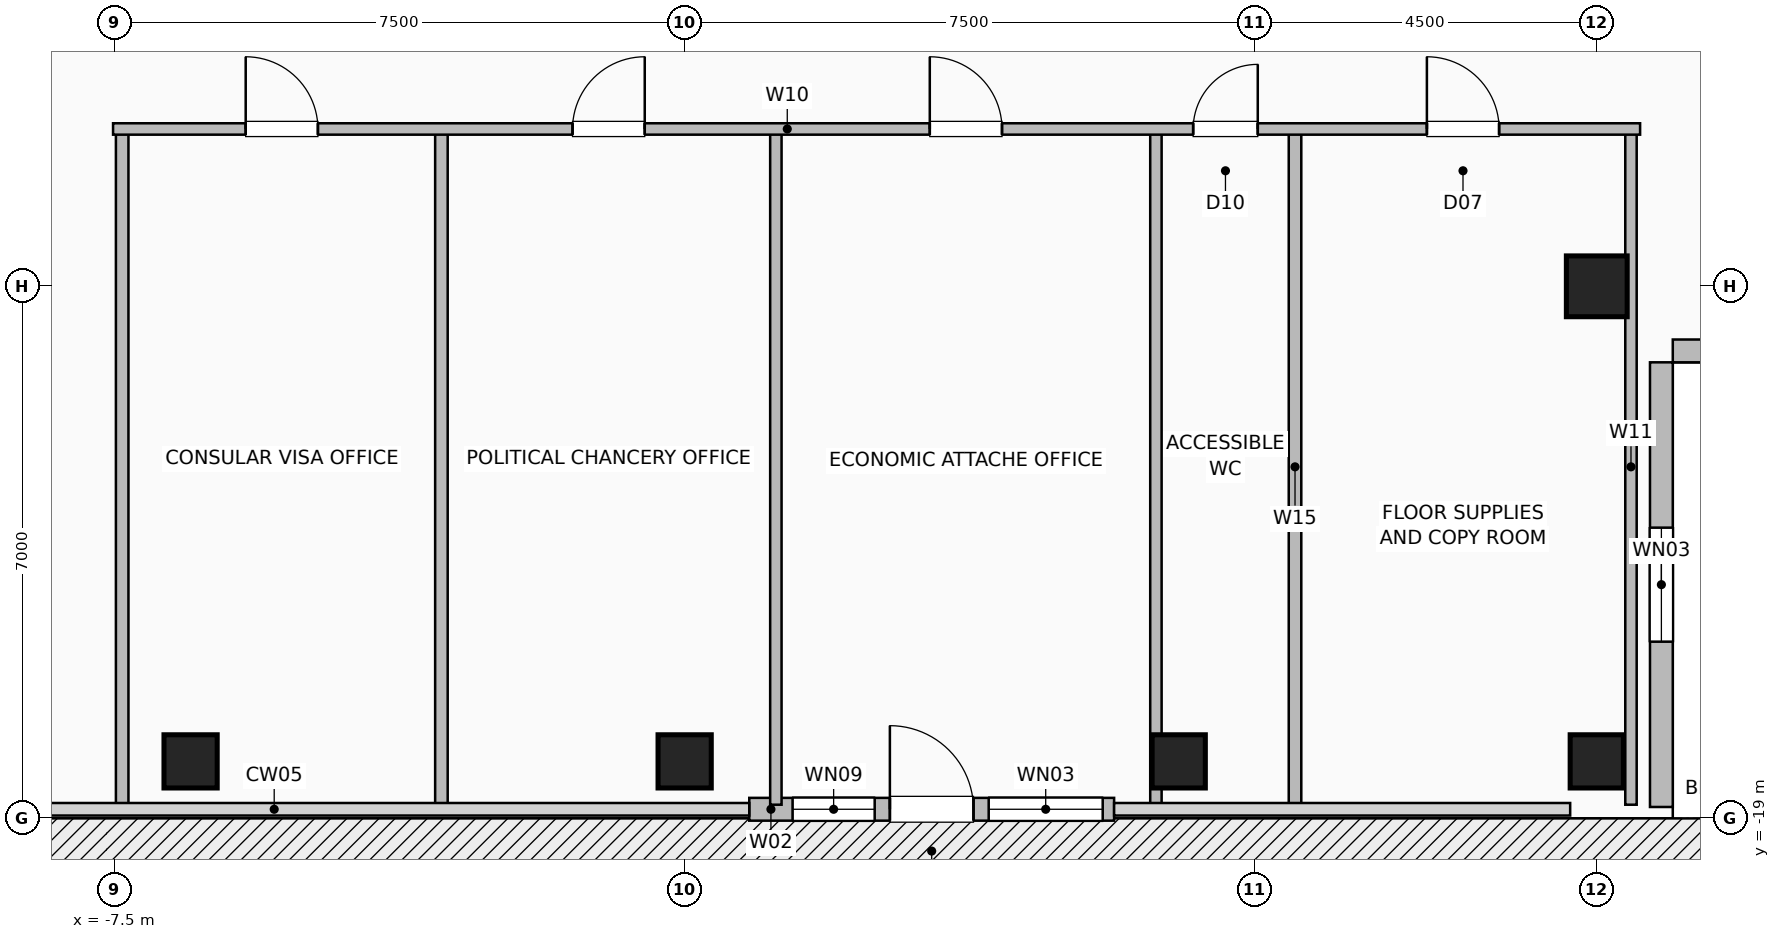
"""IFC4 building model, lengths in metres.
Left out: names, types, materials, properties, quantities, classifications, styles, units other than length and angle.
Written with IfcOpenShell. Run it as: python <this file> out.ifc"""

import sys

from ifc_helpers import new_model, si_unit, direction, frame, frame_2d, origin, origin_2d, place, context, subcontext, project, spatial, rectangle, hollow_rectangle, extrude, element, fill, save


model = new_model("IFC4")
c1 = context("Model", 3, precision=1e-05, world=origin(), true_north=direction((0.0, 1.0)))
c2 = subcontext(c1, "Body", "Model", "MODEL_VIEW")
j1 = project(units=[si_unit("LENGTHUNIT", "METRE"), si_unit("PLANEANGLEUNIT", "RADIAN")], contexts=[c1])
p1 = place(None, origin())
s1 = spatial("IfcSite", under=j1, at=p1, CompositionType="ELEMENT")
p2 = place(p1, origin())
s2 = spatial("IfcBuilding", under=s1, at=p2, CompositionType="ELEMENT")
p3 = place(p2, frame((0.0, 0.0, 232.4)))
s3 = spatial("IfcBuildingStorey", under=s2, at=p3, CompositionType="ELEMENT", Elevation=232.4)
for number, where, z_axis, x_axis in (
    (1, (-6.5, -18.25, -0.4), (0.0, 0.0, 1.0), (1.0, 0.0, 0.0)),
    (2, (0.0, -18.25, -0.4), (0.0, 0.0, 1.0), (1.0, 0.0, 0.0)),
    (3, (6.5, -18.25, -0.4), (0.0, 0.0, 1.0), (1.0, 0.0, 0.0)),
    (4, (12.0, -18.25, -0.4), (0.0, 0.0, 1.0), (1.0, 0.0, 0.0)),
):
    element("IfcColumn", number, at=place(p3, frame(where, z_axis=z_axis, x_axis=x_axis)), inside=s3, PredefinedType="COLUMN", context=c2, shape_type="SweptSolid", body=[
        extrude(hollow_rectangle(XDim=0.7, YDim=0.7, WallThickness=0.035, at=origin_2d()), origin(), (0.0, 0.0, 1.0), 4.0),
    ])
p4 = place(p3, frame((12.0, -12.0, -0.4), z_axis=(0.0, 0.0, 1.0), x_axis=(1.0, 0.0, 0.0)))
e5 = element("IfcColumn", 5, at=p4, inside=s3, PredefinedType="COLUMN", context=c2, shape_type="SweptSolid", body=[
    extrude(hollow_rectangle(XDim=0.8, YDim=0.8, WallThickness=0.04, at=origin_2d()), origin(), (0.0, 0.0, 1.0), 4.0),
])
p5 = place(p3, frame((0.85, -18.88, 0.0), z_axis=(0.0, 0.0, 1.0), x_axis=(1.0, 0.0, 0.0)))
e6 = element("IfcWall", 6, at=p5, inside=s3, PredefinedType="SOLIDWALL", context=c2, shape_type="SweptSolid", body=[
    extrude(rectangle(XDim=4.8, YDim=0.3, at=frame_2d((2.4, 0.0))), origin(), (0.0, 0.0, 1.0), 3.36),
])
p6 = place(p5, frame((1.85, 0.0, 0.0)))
e7 = element("IfcOpeningElement", 7, at=p6, cuts=e6, PredefinedType="OPENING", context=c2, shape_type="SweptSolid", body=[
    extrude(rectangle(XDim=1.1, YDim=2.2, at=frame_2d((0.55, 1.1))), frame((0.0, 0.16, 0.0), z_axis=(0.0, -1.0, 0.0), x_axis=(1.0, 0.0, 0.0)), (0.0, 0.0, 1.0), 0.32),
])
p7 = place(p5, frame((0.57, 0.0, 0.85)))
e8 = element("IfcOpeningElement", 8, at=p7, cuts=e6, PredefinedType="OPENING", context=c2, shape_type="SweptSolid", body=[
    extrude(rectangle(XDim=1.08, YDim=1.8, at=frame_2d((0.54, 0.9))), frame((0.0, 0.16, 0.0), z_axis=(0.0, -1.0, 0.0), x_axis=(1.0, 0.0, 0.0)), (0.0, 0.0, 1.0), 0.32),
])
p8 = place(p5, frame((3.15, 0.0, 0.85)))
e9 = element("IfcOpeningElement", 9, at=p8, cuts=e6, PredefinedType="OPENING", context=c2, shape_type="SweptSolid", body=[
    extrude(rectangle(XDim=1.5, YDim=1.8, at=frame_2d((0.75, 0.9))), frame((0.0, 0.16, 0.0), z_axis=(0.0, -1.0, 0.0), x_axis=(1.0, 0.0, 0.0)), (0.0, 0.0, 1.0), 0.32),
])
p9 = place(p3, frame((12.85, -18.85, 0.0), z_axis=(0.0, 0.0, 1.0), x_axis=(0.0, 1.0, 0.0)))
e10 = element("IfcWall", 10, at=p9, inside=s3, PredefinedType="SOLIDWALL", context=c2, shape_type="SweptSolid", body=[
    extrude(rectangle(XDim=5.85, YDim=0.3, at=frame_2d((2.925, 0.0))), origin(), (0.0, 0.0, 1.0), 3.36),
])
p10 = place(p9, frame((2.175, 0.0, 0.9)))
e11 = element("IfcOpeningElement", 11, at=p10, cuts=e10, PredefinedType="OPENING", context=c2, shape_type="SweptSolid", body=[
    extrude(rectangle(XDim=1.5, YDim=1.8, at=frame_2d((0.75, 0.9))), frame((0.0, 0.16, 0.0), z_axis=(0.0, -1.0, 0.0), x_axis=(1.0, 0.0, 0.0)), (0.0, 0.0, 1.0), 0.32),
])
p11 = place(p3, frame((18.85, -12.85, 0.0), z_axis=(0.0, 0.0, 1.0), x_axis=(-1.0, 0.0, 0.0)))
e12 = element("IfcWall", 12, at=p11, inside=s3, PredefinedType="SOLIDWALL", context=c2, shape_type="SweptSolid", body=[
    extrude(rectangle(XDim=5.85, YDim=0.3, at=frame_2d((2.925, 0.0))), origin(), (0.0, 0.0, 1.0), 3.36),
])
for number, where, z_axis, x_axis in (
    (13, (8.03, -18.82, 0.0), (0.0, 0.0, 1.0), (0.0, 1.0, 0.0)),
    (14, (-7.4, -18.82, 0.0), (0.0, 0.0, 1.0), (0.0, 1.0, 0.0)),
    (15, (-3.2, -18.82, 0.0), (0.0, 0.0, 1.0), (0.0, 1.0, 0.0)),
):
    element("IfcWall", number, at=place(p3, frame(where, z_axis=z_axis, x_axis=x_axis)), inside=s3, PredefinedType="PLUMBINGWALL", context=c2, shape_type="SweptSolid", body=[
        extrude(rectangle(XDim=8.89, YDim=0.165, at=frame_2d((4.445, 0.0))), origin(), (0.0, 0.0, 1.0), 3.36),
    ])
for number, where, z_axis, x_axis in (
    (16, (1.2, -18.82, 0.0), (0.0, 0.0, 1.0), (0.0, 1.0, 0.0)),
    (17, (6.2, -18.82, 0.0), (0.0, 0.0, 1.0), (0.0, 1.0, 0.0)),
    (18, (12.45, -18.82, 0.0), (0.0, 0.0, 1.0), (0.0, 1.0, 0.0)),
):
    element("IfcWall", number, at=place(p3, frame(where, z_axis=z_axis, x_axis=x_axis)), inside=s3, PredefinedType="PARTITIONING", context=c2, shape_type="SweptSolid", body=[
        extrude(rectangle(XDim=8.89, YDim=0.15, at=frame_2d((4.445, 0.0))), origin(), (0.0, 0.0, 1.0), 3.36),
    ])
p12 = place(p3, frame((-7.52, -9.93, 0.0), z_axis=(0.0, 0.0, 1.0), x_axis=(1.0, 0.0, 0.0)))
e19 = element("IfcWall", 19, at=p12, inside=s3, PredefinedType="PARTITIONING", context=c2, shape_type="SweptSolid", body=[
    extrude(rectangle(XDim=20.09, YDim=0.15, at=frame_2d((10.045, 0.0))), origin(), (0.0, 0.0, 1.0), 3.36),
])
p13 = place(p12, frame((1.745, 0.0, 0.0)))
e20 = element("IfcOpeningElement", 20, at=p13, cuts=e19, PredefinedType="OPENING", context=c2, shape_type="SweptSolid", body=[
    extrude(rectangle(XDim=0.95, YDim=2.06, at=frame_2d((0.475, 1.03))), frame((0.0, 0.085, 0.0), z_axis=(0.0, -1.0, 0.0), x_axis=(1.0, 0.0, 0.0)), (0.0, 0.0, 1.0), 0.17),
])
p14 = place(p12, frame((6.045, 0.0, 0.0)))
e21 = element("IfcOpeningElement", 21, at=p14, cuts=e19, PredefinedType="OPENING", context=c2, shape_type="SweptSolid", body=[
    extrude(rectangle(XDim=0.95, YDim=2.06, at=frame_2d((0.475, 1.03))), frame((0.0, 0.085, 0.0), z_axis=(0.0, -1.0, 0.0), x_axis=(1.0, 0.0, 0.0)), (0.0, 0.0, 1.0), 0.17),
])
p15 = place(p12, frame((10.745, 0.0, 0.0)))
e22 = element("IfcOpeningElement", 22, at=p15, cuts=e19, PredefinedType="OPENING", context=c2, shape_type="SweptSolid", body=[
    extrude(rectangle(XDim=0.95, YDim=2.06, at=frame_2d((0.475, 1.03))), frame((0.0, 0.085, 0.0), z_axis=(0.0, -1.0, 0.0), x_axis=(1.0, 0.0, 0.0)), (0.0, 0.0, 1.0), 0.17),
])
p16 = place(p12, frame((14.21, 0.0, 0.0)))
e23 = element("IfcOpeningElement", 23, at=p16, cuts=e19, PredefinedType="OPENING", context=c2, shape_type="SweptSolid", body=[
    extrude(rectangle(XDim=0.85, YDim=2.05, at=frame_2d((0.425, 1.025))), frame((0.0, 0.085, 0.0), z_axis=(0.0, -1.0, 0.0), x_axis=(1.0, 0.0, 0.0)), (0.0, 0.0, 1.0), 0.17),
])
p17 = place(p12, frame((17.285, 0.0, 0.0)))
e24 = element("IfcOpeningElement", 24, at=p17, cuts=e19, PredefinedType="OPENING", context=c2, shape_type="SweptSolid", body=[
    extrude(rectangle(XDim=0.95, YDim=2.06, at=frame_2d((0.475, 1.03))), frame((0.0, 0.085, 0.0), z_axis=(0.0, -1.0, 0.0), x_axis=(1.0, 0.0, 0.0)), (0.0, 0.0, 1.0), 0.17),
])
p18 = place(p6, origin())
e25 = element("IfcDoor", 25, at=p18, inside=s3, OperationType="SINGLE_SWING_LEFT", PredefinedType="DOOR", context=c2, shape_type="SweptSolid", body=[
    extrude(rectangle(XDim=1.1, YDim=2.2, at=frame_2d((0.55, 1.1))), frame((0.0, 0.025, 0.0), z_axis=(0.0, -1.0, 0.0), x_axis=(1.0, 0.0, 0.0)), (0.0, 0.0, 1.0), 0.05),
])
fill(e7, e25)
p19 = place(p7, origin())
e26 = element("IfcWindow", 26, at=p19, inside=s3, PartitioningType="SINGLE_PANEL", PredefinedType="WINDOW", context=c2, shape_type="SweptSolid", body=[
    extrude(rectangle(XDim=1.08, YDim=1.8, at=frame_2d((0.54, 0.9))), frame((0.0, 0.03, 0.0), z_axis=(0.0, -1.0, 0.0), x_axis=(1.0, 0.0, 0.0)), (0.0, 0.0, 1.0), 0.06),
])
fill(e8, e26)
p20 = place(p8, origin())
e27 = element("IfcWindow", 27, at=p20, inside=s3, PartitioningType="SINGLE_PANEL", PredefinedType="WINDOW", context=c2, shape_type="SweptSolid", body=[
    extrude(rectangle(XDim=1.5, YDim=1.8, at=frame_2d((0.75, 0.9))), frame((0.0, 0.03, 0.0), z_axis=(0.0, -1.0, 0.0), x_axis=(1.0, 0.0, 0.0)), (0.0, 0.0, 1.0), 0.06),
])
fill(e9, e27)
p21 = place(p10, origin())
e28 = element("IfcWindow", 28, at=p21, inside=s3, PartitioningType="SINGLE_PANEL", PredefinedType="WINDOW", context=c2, shape_type="SweptSolid", body=[
    extrude(rectangle(XDim=1.5, YDim=1.8, at=frame_2d((0.75, 0.9))), frame((0.0, 0.03, 0.0), z_axis=(0.0, -1.0, 0.0), x_axis=(1.0, 0.0, 0.0)), (0.0, 0.0, 1.0), 0.06),
])
fill(e11, e28)
p22 = place(p13, origin())
e29 = element("IfcDoor", 29, at=p22, inside=s3, OperationType="SINGLE_SWING_LEFT", PredefinedType="DOOR", context=c2, shape_type="SweptSolid", body=[
    extrude(rectangle(XDim=0.95, YDim=2.06, at=frame_2d((0.475, 1.03))), frame((0.0, 0.025, 0.0), z_axis=(0.0, -1.0, 0.0), x_axis=(1.0, 0.0, 0.0)), (0.0, 0.0, 1.0), 0.05),
])
fill(e20, e29)
p23 = place(p14, origin())
e30 = element("IfcDoor", 30, at=p23, inside=s3, OperationType="SINGLE_SWING_RIGHT", PredefinedType="DOOR", context=c2, shape_type="SweptSolid", body=[
    extrude(rectangle(XDim=0.95, YDim=2.06, at=frame_2d((0.475, 1.03))), frame((0.0, 0.025, 0.0), z_axis=(0.0, -1.0, 0.0), x_axis=(1.0, 0.0, 0.0)), (0.0, 0.0, 1.0), 0.05),
])
fill(e21, e30)
p24 = place(p15, origin())
e31 = element("IfcDoor", 31, at=p24, inside=s3, OperationType="SINGLE_SWING_LEFT", PredefinedType="DOOR", context=c2, shape_type="SweptSolid", body=[
    extrude(rectangle(XDim=0.95, YDim=2.06, at=frame_2d((0.475, 1.03))), frame((0.0, 0.025, 0.0), z_axis=(0.0, -1.0, 0.0), x_axis=(1.0, 0.0, 0.0)), (0.0, 0.0, 1.0), 0.05),
])
fill(e22, e31)
p25 = place(p16, origin())
e32 = element("IfcDoor", 32, at=p25, inside=s3, OperationType="SINGLE_SWING_RIGHT", PredefinedType="DOOR", context=c2, shape_type="SweptSolid", body=[
    extrude(rectangle(XDim=0.85, YDim=2.05, at=frame_2d((0.425, 1.025))), frame((0.0, 0.025, 0.0), z_axis=(0.0, -1.0, 0.0), x_axis=(1.0, 0.0, 0.0)), (0.0, 0.0, 1.0), 0.05),
])
fill(e23, e32)
p26 = place(p17, origin())
e33 = element("IfcDoor", 33, at=p26, inside=s3, OperationType="SINGLE_SWING_LEFT", PredefinedType="DOOR", context=c2, shape_type="SweptSolid", body=[
    extrude(rectangle(XDim=0.95, YDim=2.06, at=frame_2d((0.475, 1.03))), frame((0.0, 0.025, 0.0), z_axis=(0.0, -1.0, 0.0), x_axis=(1.0, 0.0, 0.0)), (0.0, 0.0, 1.0), 0.05),
])
fill(e24, e33)
save(model, sys.argv[1])
